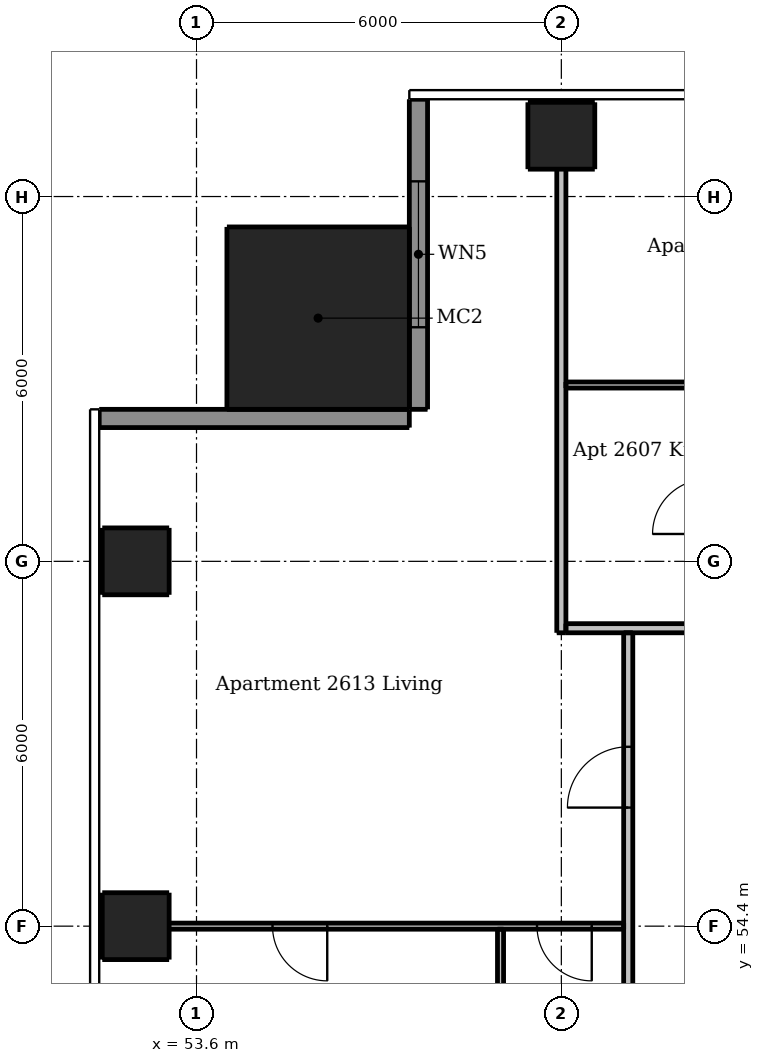
"""IFC4 building model, lengths in metres.
Left out: names, types, materials, properties, quantities, classifications, styles, units other than length and angle.
Written with IfcOpenShell. Run it as: python <this file> out.ifc"""

import sys

from ifc_helpers import new_model, si_unit, direction, frame, frame_2d, origin, origin_2d, place, context, subcontext, project, spatial, rectangle, extrude, element, fill, save


model = new_model("IFC4")
c1 = context("Model", 3, precision=1e-05, world=origin(), true_north=direction((0.0, 1.0)))
c2 = subcontext(c1, "Body", "Model", "MODEL_VIEW")
j1 = project(units=[si_unit("LENGTHUNIT", "METRE"), si_unit("PLANEANGLEUNIT", "RADIAN")], contexts=[c1])
p1 = place(None, origin())
s1 = spatial("IfcSite", under=j1, at=p1, CompositionType="ELEMENT")
p2 = place(p1, origin())
s2 = spatial("IfcBuilding", under=s1, at=p2, CompositionType="ELEMENT")
p3 = place(p2, frame((0.0, 0.0, 98.5)))
s3 = spatial("IfcBuildingStorey", under=s2, at=p3, CompositionType="ELEMENT", Elevation=98.5)
for number, where, z_axis, x_axis in (
    (1, (59.6, 67.4, 0.0), (0.0, 0.0, 1.0), (1.0, 0.0, 0.0)),
    (2, (52.6, 54.4, 0.0), (0.0, 0.0, 1.0), (1.0, 0.0, 0.0)),
    (3, (52.6, 60.4, 0.0), (0.0, 0.0, 1.0), (1.0, 0.0, 0.0)),
):
    element("IfcColumn", number, at=place(p3, frame(where, z_axis=z_axis, x_axis=x_axis)), inside=s3, PredefinedType="COLUMN", context=c2, shape_type="SweptSolid", body=[
        extrude(rectangle(XDim=1.1, YDim=1.1, at=origin_2d()), origin(), (0.0, 0.0, 1.0), 3.05),
    ])
p4 = place(p3, frame((55.6, 64.4, 0.0), z_axis=(0.0, 0.0, 1.0), x_axis=(1.0, 0.0, 0.0)))
e4 = element("IfcColumn", 4, at=p4, inside=s3, PredefinedType="COLUMN", context=c2, shape_type="SweptSolid", body=[
    extrude(rectangle(XDim=3.0, YDim=3.0, at=origin_2d()), origin(), (0.0, 0.0, 1.0), 3.3),
])
p5 = place(p3, frame((57.25, 68.0, 0.0), z_axis=(0.0, 0.0, 1.0), x_axis=(0.0, -1.0, 0.0)))
e5 = element("IfcWall", 5, at=p5, inside=s3, PredefinedType="SOLIDWALL", context=c2, shape_type="SweptSolid", body=[
    extrude(rectangle(XDim=5.1, YDim=0.3, at=frame_2d((2.55, 0.0))), origin(), (0.0, 0.0, 1.0), 3.05),
])
p6 = place(p5, frame((1.35, 0.0, 0.15)))
e6 = element("IfcOpeningElement", 6, at=p6, cuts=e5, PredefinedType="OPENING", context=c2, shape_type="SweptSolid", body=[
    extrude(rectangle(XDim=2.4, YDim=2.1, at=frame_2d((1.2, 1.05))), frame((0.0, 0.16, 0.0), z_axis=(0.0, -1.0, 0.0), x_axis=(1.0, 0.0, 0.0)), (0.0, 0.0, 1.0), 0.32),
])
p7 = place(p3, frame((57.1, 62.75, 0.0), z_axis=(0.0, 0.0, 1.0), x_axis=(-1.0, 0.0, 0.0)))
e7 = element("IfcWall", 7, at=p7, inside=s3, PredefinedType="SOLIDWALL", context=c2, shape_type="SweptSolid", body=[
    extrude(rectangle(XDim=5.1, YDim=0.3, at=frame_2d((2.55, 0.0))), origin(), (0.0, 0.0, 1.0), 3.05),
])
p8 = place(p3, frame((58.6, 54.35, 0.0), z_axis=(0.0, 0.0, 1.0), x_axis=(0.0, -1.0, 0.0)))
e8 = element("IfcWall", 8, at=p8, inside=s3, PredefinedType="PARTITIONING", context=c2, shape_type="SweptSolid", body=[
    extrude(rectangle(XDim=5.875, YDim=0.1, at=frame_2d((2.938, 0.0))), origin(), (0.0, 0.0, 1.0), 3.05),
])
p9 = place(p8, frame((3.75, 0.0, 0.0)))
e9 = element("IfcOpeningElement", 9, at=p9, cuts=e8, PredefinedType="OPENING", context=c2, shape_type="SweptSolid", body=[
    extrude(rectangle(XDim=0.8, YDim=2.1, at=frame_2d((0.4, 1.05))), frame((0.0, 0.06, 0.0), z_axis=(0.0, -1.0, 0.0), x_axis=(1.0, 0.0, 0.0)), (0.0, 0.0, 1.0), 0.12),
])
p10 = place(p3, frame((59.675, 63.3, 0.0), z_axis=(0.0, 0.0, 1.0), x_axis=(1.0, 0.0, 0.0)))
e10 = element("IfcWall", 10, at=p10, inside=s3, PredefinedType="PARTITIONING", context=c2, shape_type="SweptSolid", body=[
    extrude(rectangle(XDim=2.275, YDim=0.1, at=frame_2d((1.137, 0.0))), origin(), (0.0, 0.0, 1.0), 3.05),
])
p11 = place(p3, frame((60.625, 54.4, 0.0), z_axis=(0.0, 0.0, 1.0), x_axis=(-1.0, 0.0, 0.0)))
e11 = element("IfcWall", 11, at=p11, inside=s3, PredefinedType="PARTITIONING", context=c2, shape_type="SweptSolid", body=[
    extrude(rectangle(XDim=8.625, YDim=0.1, at=frame_2d((4.312, 0.0))), origin(), (0.0, 0.0, 1.0), 2.516),
])
p12 = place(p11, frame((0.525, 0.0, 0.0)))
e12 = element("IfcOpeningElement", 12, at=p12, cuts=e11, PredefinedType="OPENING", context=c2, shape_type="SweptSolid", body=[
    extrude(rectangle(XDim=0.9, YDim=2.1, at=frame_2d((0.45, 1.05))), frame((0.0, 0.06, 0.0), z_axis=(0.0, -1.0, 0.0), x_axis=(1.0, 0.0, 0.0)), (0.0, 0.0, 1.0), 0.12),
])
p13 = place(p11, frame((4.875, 0.0, 0.0)))
e13 = element("IfcOpeningElement", 13, at=p13, cuts=e11, PredefinedType="OPENING", context=c2, shape_type="SweptSolid", body=[
    extrude(rectangle(XDim=0.9, YDim=2.1, at=frame_2d((0.45, 1.05))), frame((0.0, 0.06, 0.0), z_axis=(0.0, -1.0, 0.0), x_axis=(1.0, 0.0, 0.0)), (0.0, 0.0, 1.0), 0.12),
])
p14 = place(p3, frame((59.6, 59.225, 0.0), z_axis=(0.0, 0.0, 1.0), x_axis=(0.0, 1.0, 0.0)))
e14 = element("IfcWall", 14, at=p14, inside=s3, PredefinedType="PARTITIONING", context=c2, shape_type="SweptSolid", body=[
    extrude(rectangle(XDim=8.775, YDim=0.15, at=frame_2d((4.387, 0.0))), origin(), (0.0, 0.0, 1.0), 2.51),
])
p15 = place(p3, frame((60.7, 30.325, 0.0), z_axis=(0.0, 0.0, 1.0), x_axis=(0.0, 1.0, 0.0)))
e15 = element("IfcWall", 15, at=p15, inside=s3, PredefinedType="PARTITIONING", context=c2, shape_type="SweptSolid", body=[
    extrude(rectangle(XDim=28.9, YDim=0.15, at=frame_2d((14.45, 0.0))), origin(), (0.0, 0.0, 1.0), 3.05),
])
p16 = place(p15, frame((2.575, 0.0, 0.0)))
e16 = element("IfcOpeningElement", 16, at=p16, cuts=e15, PredefinedType="OPENING", context=c2, shape_type="SweptSolid", body=[
    extrude(rectangle(XDim=1.0, YDim=2.1, at=frame_2d((0.5, 1.05))), frame((0.0, 0.085, 0.0), z_axis=(0.0, -1.0, 0.0), x_axis=(1.0, 0.0, 0.0)), (0.0, 0.0, 1.0), 0.17),
])
p17 = place(p15, frame((8.575, 0.0, 0.0)))
e17 = element("IfcOpeningElement", 17, at=p17, cuts=e15, PredefinedType="OPENING", context=c2, shape_type="SweptSolid", body=[
    extrude(rectangle(XDim=1.0, YDim=2.1, at=frame_2d((0.5, 1.05))), frame((0.0, 0.085, 0.0), z_axis=(0.0, -1.0, 0.0), x_axis=(1.0, 0.0, 0.0)), (0.0, 0.0, 1.0), 0.17),
])
p18 = place(p15, frame((14.575, 0.0, 0.0)))
e18 = element("IfcOpeningElement", 18, at=p18, cuts=e15, PredefinedType="OPENING", context=c2, shape_type="SweptSolid", body=[
    extrude(rectangle(XDim=1.0, YDim=2.1, at=frame_2d((0.5, 1.05))), frame((0.0, 0.085, 0.0), z_axis=(0.0, -1.0, 0.0), x_axis=(1.0, 0.0, 0.0)), (0.0, 0.0, 1.0), 0.17),
])
p19 = place(p15, frame((26.025, 0.0, 0.0)))
e19 = element("IfcOpeningElement", 19, at=p19, cuts=e15, PredefinedType="OPENING", context=c2, shape_type="SweptSolid", body=[
    extrude(rectangle(XDim=1.0, YDim=2.1, at=frame_2d((0.5, 1.05))), frame((0.0, 0.085, 0.0), z_axis=(0.0, -1.0, 0.0), x_axis=(1.0, 0.0, 0.0)), (0.0, 0.0, 1.0), 0.17),
])
p20 = place(p3, frame((59.675, 59.3, 0.0), z_axis=(0.0, 0.0, 1.0), x_axis=(1.0, 0.0, 0.0)))
e20 = element("IfcWall", 20, at=p20, inside=s3, PredefinedType="PARTITIONING", context=c2, shape_type="SweptSolid", body=[
    extrude(rectangle(XDim=28.55, YDim=0.15, at=frame_2d((14.275, 0.0))), origin(), (0.0, 0.0, 1.0), 3.05),
])
p21 = place(p20, frame((3.625, 0.0, 0.0)))
e21 = element("IfcOpeningElement", 21, at=p21, cuts=e20, PredefinedType="OPENING", context=c2, shape_type="SweptSolid", body=[
    extrude(rectangle(XDim=1.0, YDim=2.1, at=frame_2d((0.5, 1.05))), frame((0.0, 0.085, 0.0), z_axis=(0.0, -1.0, 0.0), x_axis=(1.0, 0.0, 0.0)), (0.0, 0.0, 1.0), 0.17),
])
p22 = place(p20, frame((14.425, 0.0, 0.0)))
e22 = element("IfcOpeningElement", 22, at=p22, cuts=e20, PredefinedType="OPENING", context=c2, shape_type="SweptSolid", body=[
    extrude(rectangle(XDim=1.0, YDim=2.1, at=frame_2d((0.5, 1.05))), frame((0.0, 0.085, 0.0), z_axis=(0.0, -1.0, 0.0), x_axis=(1.0, 0.0, 0.0)), (0.0, 0.0, 1.0), 0.17),
])
p23 = place(p20, frame((25.775, 0.0, 0.0)))
e23 = element("IfcOpeningElement", 23, at=p23, cuts=e20, PredefinedType="OPENING", context=c2, shape_type="SweptSolid", body=[
    extrude(rectangle(XDim=1.0, YDim=2.1, at=frame_2d((0.5, 1.05))), frame((0.0, 0.085, 0.0), z_axis=(0.0, -1.0, 0.0), x_axis=(1.0, 0.0, 0.0)), (0.0, 0.0, 1.0), 0.17),
])
p24 = place(p6, origin())
e24 = element("IfcWindow", 24, at=p24, inside=s3, PartitioningType="DOUBLE_PANEL_VERTICAL", PredefinedType="WINDOW", context=c2, shape_type="SweptSolid", body=[
    extrude(rectangle(XDim=2.4, YDim=2.1, at=frame_2d((1.2, 1.05))), frame((0.0, 0.03, 0.0), z_axis=(0.0, -1.0, 0.0), x_axis=(1.0, 0.0, 0.0)), (0.0, 0.0, 1.0), 0.06),
])
fill(e6, e24)
p25 = place(p19, origin())
e25 = element("IfcDoor", 25, at=p25, inside=s3, OperationType="SINGLE_SWING_LEFT", PredefinedType="DOOR", context=c2, shape_type="SweptSolid", body=[
    extrude(rectangle(XDim=1.0, YDim=2.1, at=frame_2d((0.5, 1.05))), frame((0.0, 0.025, 0.0), z_axis=(0.0, -1.0, 0.0), x_axis=(1.0, 0.0, 0.0)), (0.0, 0.0, 1.0), 0.05),
])
fill(e19, e25)
p26 = place(p12, origin())
e26 = element("IfcDoor", 26, at=p26, inside=s3, OperationType="SINGLE_SWING_LEFT", PredefinedType="DOOR", context=c2, shape_type="SweptSolid", body=[
    extrude(rectangle(XDim=0.9, YDim=2.1, at=frame_2d((0.45, 1.05))), frame((0.0, 0.025, 0.0), z_axis=(0.0, -1.0, 0.0), x_axis=(1.0, 0.0, 0.0)), (0.0, 0.0, 1.0), 0.05),
])
fill(e12, e26)
p27 = place(p13, origin())
e27 = element("IfcDoor", 27, at=p27, inside=s3, OperationType="SINGLE_SWING_LEFT", PredefinedType="DOOR", context=c2, shape_type="SweptSolid", body=[
    extrude(rectangle(XDim=0.9, YDim=2.1, at=frame_2d((0.45, 1.05))), frame((0.0, 0.025, 0.0), z_axis=(0.0, -1.0, 0.0), x_axis=(1.0, 0.0, 0.0)), (0.0, 0.0, 1.0), 0.05),
])
fill(e13, e27)
save(model, sys.argv[1])
